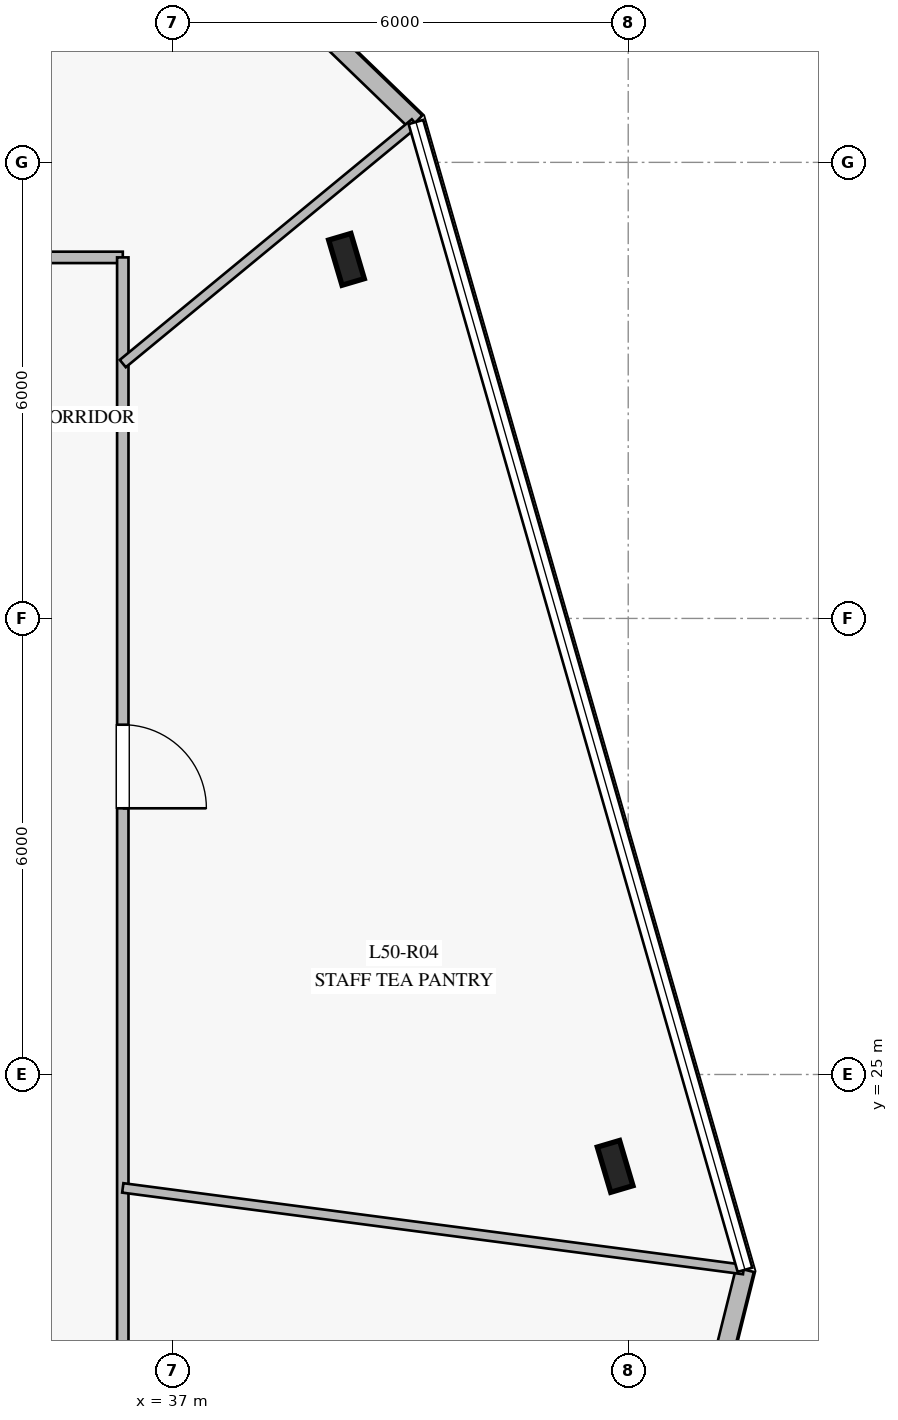
"""IFC4 building model, lengths in metres.
Left out: names, types, materials, properties, quantities, classifications, styles, units other than length and angle.
Written with IfcOpenShell. Run it as: python <this file> out.ifc"""

import sys

from ifc_helpers import new_model, si_unit, direction, frame, frame_2d, origin, origin_2d, place, context, subcontext, project, spatial, rectangle, i_section, extrude, element, fill, save


model = new_model("IFC4")
c1 = context("Model", 3, precision=1e-05, world=origin(), true_north=direction((0.0, 1.0)))
c2 = subcontext(c1, "Body", "Model", "MODEL_VIEW")
j1 = project(units=[si_unit("LENGTHUNIT", "METRE"), si_unit("PLANEANGLEUNIT", "RADIAN")], contexts=[c1])
p1 = place(None, origin())
s1 = spatial("IfcSite", under=j1, at=p1, CompositionType="ELEMENT")
p2 = place(p1, origin())
s2 = spatial("IfcBuilding", under=s1, at=p2, CompositionType="ELEMENT")
p3 = place(p2, frame((0.0, 0.0, 208.8)))
s3 = spatial("IfcBuildingStorey", under=s2, at=p3, CompositionType="ELEMENT", Elevation=208.8)
for number, where, z_axis, x_axis in (
    (1, (42.828, 23.791, 0.0), (0.0, 0.0, 1.0), (-0.284, 0.959, 0.0)),
    (2, (39.293, 35.724, 0.0), (0.0, 0.0, 1.0), (-0.284, 0.959, 0.0)),
):
    element("IfcColumn", number, at=place(p3, frame(where, z_axis=z_axis, x_axis=x_axis)), inside=s3, PredefinedType="COLUMN", context=c2, shape_type="SweptSolid", body=[
        extrude(i_section(OverallWidth=0.305, OverallDepth=0.62, WebThickness=0.021, FlangeThickness=0.04, at=origin_2d()), origin(), (0.0, 0.0, 1.0), 4.0),
    ])
p4 = place(p3, frame((43.456, 18.096, 0.0), z_axis=(0.0, 0.0, 1.0), x_axis=(0.241712587921, 0.970347888564, 0.0)))
e3 = element("IfcWall", 3, at=p4, inside=s3, PredefinedType="STANDARD", context=c2, shape_type="SweptSolid", body=[
    extrude(rectangle(XDim=4.468, YDim=0.24, at=frame_2d((2.234, 0.0))), origin(), (0.0, 0.0, 1.0), 3.78),
])
p5 = place(p3, frame((40.207, 37.531, 0.0), z_axis=(0.0, 0.0, 1.0), x_axis=(-0.719320489357, 0.69467836701, 0.0)))
e4 = element("IfcWall", 4, at=p5, inside=s3, PredefinedType="STANDARD", context=c2, shape_type="SweptSolid", body=[
    extrude(rectangle(XDim=4.468, YDim=0.24, at=frame_2d((2.234, 0.0))), origin(), (0.0, 0.0, 1.0), 3.78),
])
p6 = place(p3, frame((13.65, 35.75, 0.0), z_axis=(0.0, 0.0, 1.0), x_axis=(1.0, 0.0, 0.0)))
e5 = element("IfcWall", 5, at=p6, inside=s3, PredefinedType="PARTITIONING", context=c2, shape_type="SweptSolid", body=[
    extrude(rectangle(XDim=22.7, YDim=0.15, at=frame_2d((11.35, 0.0))), origin(), (0.0, 0.0, 1.0), 3.28),
])
p7 = place(p6, frame((16.835, 0.0, 0.0)))
e6 = element("IfcOpeningElement", 6, at=p7, cuts=e5, PredefinedType="OPENING", context=c2, shape_type="SweptSolid", body=[
    extrude(rectangle(XDim=1.1, YDim=2.2, at=frame_2d((0.55, 1.1))), frame((0.0, 0.085, 0.0), z_axis=(0.0, -1.0, 0.0), x_axis=(1.0, 0.0, 0.0)), (0.0, 0.0, 1.0), 0.17),
])
p8 = place(p6, frame((7.061, 0.0, 0.0)))
e7 = element("IfcOpeningElement", 7, at=p8, cuts=e5, PredefinedType="OPENING", context=c2, shape_type="SweptSolid", body=[
    extrude(rectangle(XDim=1.1, YDim=2.2, at=frame_2d((0.55, 1.1))), frame((0.0, 0.085, 0.0), z_axis=(0.0, -1.0, 0.0), x_axis=(1.0, 0.0, 0.0)), (0.0, 0.0, 1.0), 0.17),
])
p9 = place(p6, frame((1.201, 0.0, 0.0)))
e8 = element("IfcOpeningElement", 8, at=p9, cuts=e5, PredefinedType="OPENING", context=c2, shape_type="SweptSolid", body=[
    extrude(rectangle(XDim=1.1, YDim=2.2, at=frame_2d((0.55, 1.1))), frame((0.0, 0.085, 0.0), z_axis=(0.0, -1.0, 0.0), x_axis=(1.0, 0.0, 0.0)), (0.0, 0.0, 1.0), 0.17),
])
p10 = place(p3, frame((36.35, 35.75, 0.0), z_axis=(0.0, 0.0, 1.0), x_axis=(0.0, -1.0, 0.0)))
e9 = element("IfcWall", 9, at=p10, inside=s3, PredefinedType="PARTITIONING", context=c2, shape_type="SweptSolid", body=[
    extrude(rectangle(XDim=21.5, YDim=0.15, at=frame_2d((10.75, 0.0))), origin(), (0.0, 0.0, 1.0), 3.05),
])
p11 = place(p10, frame((16.142, 0.0, 0.0)))
e10 = element("IfcOpeningElement", 10, at=p11, cuts=e9, PredefinedType="OPENING", context=c2, shape_type="SweptSolid", body=[
    extrude(rectangle(XDim=1.1, YDim=2.2, at=frame_2d((0.55, 1.1))), frame((0.0, 0.085, 0.0), z_axis=(0.0, -1.0, 0.0), x_axis=(1.0, 0.0, 0.0)), (0.0, 0.0, 1.0), 0.17),
])
p12 = place(p10, frame((6.148, 0.0, 0.0)))
e11 = element("IfcOpeningElement", 11, at=p12, cuts=e9, PredefinedType="OPENING", context=c2, shape_type="SweptSolid", body=[
    extrude(rectangle(XDim=1.1, YDim=2.2, at=frame_2d((0.55, 1.1))), frame((0.0, 0.085, 0.0), z_axis=(0.0, -1.0, 0.0), x_axis=(1.0, 0.0, 0.0)), (0.0, 0.0, 1.0), 0.17),
])
p13 = place(p3, frame((36.35, 23.508, 0.0), z_axis=(0.0, 0.0, 1.0), x_axis=(0.991466193804, -0.130364053878, 0.0)))
e12 = element("IfcWall", 12, at=p13, inside=s3, PredefinedType="PARTITIONING", context=c2, shape_type="SweptSolid", body=[
    extrude(rectangle(XDim=8.238, YDim=0.125, at=frame_2d((4.119, 0.0))), origin(), (0.0, 0.0, 1.0), 3.05),
])
p14 = place(p3, frame((36.35, 34.353, 0.0), z_axis=(0.0, 0.0, 1.0), x_axis=(0.771814163285, 0.63584817162, 0.0)))
e13 = element("IfcWall", 13, at=p14, inside=s3, PredefinedType="PARTITIONING", context=c2, shape_type="SweptSolid", body=[
    extrude(rectangle(XDim=4.979, YDim=0.125, at=frame_2d((2.49, 0.0))), origin(), (0.0, 0.0, 1.0), 3.18),
])
p15 = place(p12, origin())
e14 = element("IfcDoor", 14, at=p15, inside=s3, OperationType="SINGLE_SWING_RIGHT", PredefinedType="DOOR", context=c2, shape_type="SweptSolid", body=[
    extrude(rectangle(XDim=1.1, YDim=2.2, at=frame_2d((0.55, 1.1))), frame((0.0, 0.025, 0.0), z_axis=(0.0, -1.0, 0.0), x_axis=(1.0, 0.0, 0.0)), (0.0, 0.0, 1.0), 0.05),
])
fill(e11, e14)
save(model, sys.argv[1])
